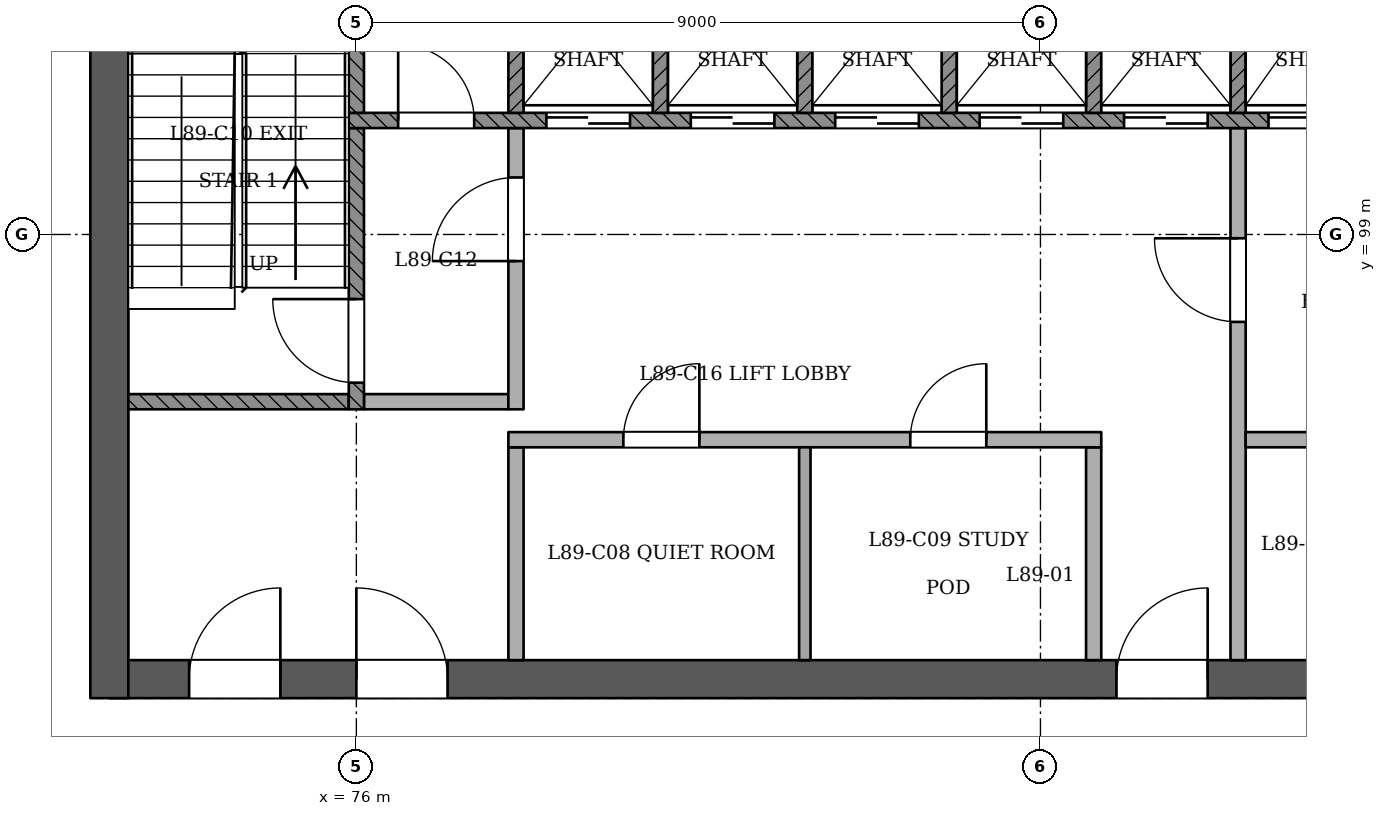
"""IFC4 building model, lengths in metres.
Left out: names, types, materials, properties, quantities, classifications, styles, units other than length and angle.
Written with IfcOpenShell. Run it as: python <this file> out.ifc"""

import sys

from ifc_helpers import new_model, si_unit, direction, frame, frame_2d, origin, place, context, subcontext, project, spatial, rectangle, extrude, element, fill, save


model = new_model("IFC4")
c1 = context("Model", 3, precision=1e-05, world=origin(), true_north=direction((0.0, 1.0)))
c2 = subcontext(c1, "Body", "Model", "MODEL_VIEW")
j1 = project(units=[si_unit("LENGTHUNIT", "METRE"), si_unit("PLANEANGLEUNIT", "RADIAN")], contexts=[c1])
p1 = place(None, origin())
s1 = spatial("IfcSite", under=j1, at=p1, CompositionType="ELEMENT")
p2 = place(p1, origin())
s2 = spatial("IfcBuilding", under=s1, at=p2, CompositionType="ELEMENT")
p3 = place(p2, frame((0.0, 0.0, 343.0)))
s3 = spatial("IfcBuildingStorey", under=s2, at=p3, CompositionType="ELEMENT", Elevation=343.0)
p4 = place(p3, frame((72.75, 93.15, 0.0), z_axis=(0.0, 0.0, 1.0), x_axis=(1.0, 0.0, 0.0)))
e1 = element("IfcWall", 1, at=p4, inside=s3, PredefinedType="SHEAR", context=c2, shape_type="SweptSolid", body=[
    extrude(rectangle(XDim=24.75, YDim=0.5, at=frame_2d((12.375, 0.0))), origin(), (0.0, 0.0, 1.0), 4.2),
])
p5 = place(p4, frame((1.05, 0.0, 0.0)))
e2 = element("IfcOpeningElement", 2, at=p5, cuts=e1, PredefinedType="OPENING", context=c2, shape_type="SweptSolid", body=[
    extrude(rectangle(XDim=1.2, YDim=2.1, at=frame_2d((0.6, 1.05))), frame((0.0, 0.26, 0.0), z_axis=(0.0, -1.0, 0.0), x_axis=(1.0, 0.0, 0.0)), (0.0, 0.0, 1.0), 0.521),
])
p6 = place(p4, frame((3.25, 0.0, 0.0)))
e3 = element("IfcOpeningElement", 3, at=p6, cuts=e1, PredefinedType="OPENING", context=c2, shape_type="SweptSolid", body=[
    extrude(rectangle(XDim=1.2, YDim=2.1, at=frame_2d((0.6, 1.05))), frame((0.0, 0.26, 0.0), z_axis=(0.0, -1.0, 0.0), x_axis=(1.0, 0.0, 0.0)), (0.0, 0.0, 1.0), 0.521),
])
p7 = place(p4, frame((13.25, 0.0, 0.0)))
e4 = element("IfcOpeningElement", 4, at=p7, cuts=e1, PredefinedType="OPENING", context=c2, shape_type="SweptSolid", body=[
    extrude(rectangle(XDim=1.2, YDim=2.1, at=frame_2d((0.6, 1.05))), frame((0.0, 0.26, 0.0), z_axis=(0.0, -1.0, 0.0), x_axis=(1.0, 0.0, 0.0)), (0.0, 0.0, 1.0), 0.521),
])
p8 = place(p4, frame((16.113, 0.0, 0.0)))
e5 = element("IfcOpeningElement", 5, at=p8, cuts=e1, PredefinedType="OPENING", context=c2, shape_type="SweptSolid", body=[
    extrude(rectangle(XDim=1.0, YDim=2.1, at=frame_2d((0.5, 1.05))), frame((0.0, 0.26, 0.0), z_axis=(0.0, -1.0, 0.0), x_axis=(1.0, 0.0, 0.0)), (0.0, 0.0, 1.0), 0.521),
])
p9 = place(p4, frame((19.55, 0.0, 0.0)))
e6 = element("IfcOpeningElement", 6, at=p9, cuts=e1, PredefinedType="OPENING", context=c2, shape_type="SweptSolid", body=[
    extrude(rectangle(XDim=1.0, YDim=2.1, at=frame_2d((0.5, 1.05))), frame((0.0, 0.26, 0.0), z_axis=(0.0, -1.0, 0.0), x_axis=(1.0, 0.0, 0.0)), (0.0, 0.0, 1.0), 0.521),
])
p10 = place(p4, frame((22.538, 0.0, 0.0)))
e7 = element("IfcOpeningElement", 7, at=p10, cuts=e1, PredefinedType="OPENING", context=c2, shape_type="SweptSolid", body=[
    extrude(rectangle(XDim=1.0, YDim=2.1, at=frame_2d((0.5, 1.05))), frame((0.0, 0.26, 0.0), z_axis=(0.0, -1.0, 0.0), x_axis=(1.0, 0.0, 0.0)), (0.0, 0.0, 1.0), 0.521),
])
p11 = place(p3, frame((72.75, 103.65, 0.0), z_axis=(0.0, 0.0, 1.0), x_axis=(0.0, -1.0, 0.0)))
e8 = element("IfcWall", 8, at=p11, inside=s3, PredefinedType="SHEAR", context=c2, shape_type="SweptSolid", body=[
    extrude(rectangle(XDim=10.75, YDim=0.5, at=frame_2d((5.375, 0.0))), origin(), (0.0, 0.0, 1.0), 4.2),
])
p12 = place(p3, frame((78.1, 93.4, 0.0), z_axis=(0.0, 0.0, 1.0), x_axis=(0.0, 1.0, 0.0)))
e9 = element("IfcWall", 9, at=p12, inside=s3, PredefinedType="PARTITIONING", context=c2, shape_type="SweptSolid", body=[
    extrude(rectangle(XDim=2.8, YDim=0.2, at=frame_2d((1.4, 0.0))), origin(), (0.0, 0.0, 1.0), 3.8),
])
p13 = place(p3, frame((81.9, 93.4, 0.0), z_axis=(0.0, 0.0, 1.0), x_axis=(0.0, 1.0, 0.0)))
e10 = element("IfcWall", 10, at=p13, inside=s3, PredefinedType="PARTITIONING", context=c2, shape_type="SweptSolid", body=[
    extrude(rectangle(XDim=2.8, YDim=0.15, at=frame_2d((1.4, 0.0))), origin(), (0.0, 0.0, 1.0), 3.8),
])
p14 = place(p3, frame((85.7, 93.4, 0.0), z_axis=(0.0, 0.0, 1.0), x_axis=(0.0, 1.0, 0.0)))
e11 = element("IfcWall", 11, at=p14, inside=s3, PredefinedType="PARTITIONING", context=c2, shape_type="SweptSolid", body=[
    extrude(rectangle(XDim=2.8, YDim=0.2, at=frame_2d((1.4, 0.0))), origin(), (0.0, 0.0, 1.0), 3.8),
])
p15 = place(p3, frame((87.6, 93.4, 0.0), z_axis=(0.0, 0.0, 1.0), x_axis=(0.0, 1.0, 0.0)))
e12 = element("IfcWall", 12, at=p15, inside=s3, PredefinedType="PARTITIONING", context=c2, shape_type="SweptSolid", body=[
    extrude(rectangle(XDim=7.0, YDim=0.2, at=frame_2d((3.5, 0.0))), origin(), (0.0, 0.0, 1.0), 3.8),
])
p16 = place(p15, frame((4.45, 0.0, 0.0)))
e13 = element("IfcOpeningElement", 13, at=p16, cuts=e12, PredefinedType="OPENING", context=c2, shape_type="SweptSolid", body=[
    extrude(rectangle(XDim=1.1, YDim=2.1, at=frame_2d((0.55, 1.05))), frame((0.0, 0.11, 0.0), z_axis=(0.0, -1.0, 0.0), x_axis=(1.0, 0.0, 0.0)), (0.0, 0.0, 1.0), 0.221),
])
p17 = place(p3, frame((78.0, 96.3, 0.0), z_axis=(0.0, 0.0, 1.0), x_axis=(1.0, 0.0, 0.0)))
e14 = element("IfcWall", 14, at=p17, inside=s3, PredefinedType="PARTITIONING", context=c2, shape_type="SweptSolid", body=[
    extrude(rectangle(XDim=7.8, YDim=0.2, at=frame_2d((3.9, 0.0))), origin(), (0.0, 0.0, 1.0), 3.8),
])
p18 = place(p17, frame((1.512, 0.0, 0.0)))
e15 = element("IfcOpeningElement", 15, at=p18, cuts=e14, PredefinedType="OPENING", context=c2, shape_type="SweptSolid", body=[
    extrude(rectangle(XDim=1.0, YDim=2.1, at=frame_2d((0.5, 1.05))), frame((0.0, 0.11, 0.0), z_axis=(0.0, -1.0, 0.0), x_axis=(1.0, 0.0, 0.0)), (0.0, 0.0, 1.0), 0.221),
])
p19 = place(p17, frame((5.288, 0.0, 0.0)))
e16 = element("IfcOpeningElement", 16, at=p19, cuts=e14, PredefinedType="OPENING", context=c2, shape_type="SweptSolid", body=[
    extrude(rectangle(XDim=1.0, YDim=2.1, at=frame_2d((0.5, 1.05))), frame((0.0, 0.11, 0.0), z_axis=(0.0, -1.0, 0.0), x_axis=(1.0, 0.0, 0.0)), (0.0, 0.0, 1.0), 0.221),
])
p20 = place(p3, frame((87.7, 96.3, 0.0), z_axis=(0.0, 0.0, 1.0), x_axis=(1.0, 0.0, 0.0)))
e17 = element("IfcWall", 17, at=p20, inside=s3, PredefinedType="PARTITIONING", context=c2, shape_type="SweptSolid", body=[
    extrude(rectangle(XDim=3.6, YDim=0.2, at=frame_2d((1.8, 0.0))), origin(), (0.0, 0.0, 1.0), 3.8),
])
p21 = place(p3, frame((73.0, 96.8, 0.0), z_axis=(0.0, 0.0, 1.0), x_axis=(1.0, 0.0, 0.0)))
e18 = element("IfcWall", 18, at=p21, inside=s3, PredefinedType="SOLIDWALL", context=c2, shape_type="SweptSolid", body=[
    extrude(rectangle(XDim=2.9, YDim=0.2, at=frame_2d((1.45, 0.0))), origin(), (0.0, 0.0, 1.0), 3.8),
])
p22 = place(p3, frame((76.0, 96.7, 0.0), z_axis=(0.0, 0.0, 1.0), x_axis=(0.0, 1.0, 0.0)))
e19 = element("IfcWall", 19, at=p22, inside=s3, PredefinedType="SOLIDWALL", context=c2, shape_type="SweptSolid", body=[
    extrude(rectangle(XDim=3.7, YDim=0.2, at=frame_2d((1.85, 0.0))), origin(), (0.0, 0.0, 1.0), 3.8),
])
p23 = place(p22, frame((0.35, 0.0, 0.0)))
e20 = element("IfcOpeningElement", 20, at=p23, cuts=e19, PredefinedType="OPENING", context=c2, shape_type="SweptSolid", body=[
    extrude(rectangle(XDim=1.1, YDim=2.1, at=frame_2d((0.55, 1.05))), frame((0.0, 0.11, 0.0), z_axis=(0.0, -1.0, 0.0), x_axis=(1.0, 0.0, 0.0)), (0.0, 0.0, 1.0), 0.221),
])
p24 = place(p3, frame((76.1, 96.8, 0.0), z_axis=(0.0, 0.0, 1.0), x_axis=(1.0, 0.0, 0.0)))
e21 = element("IfcWall", 21, at=p24, inside=s3, PredefinedType="PARTITIONING", context=c2, shape_type="SweptSolid", body=[
    extrude(rectangle(XDim=1.9, YDim=0.2, at=frame_2d((0.95, 0.0))), origin(), (0.0, 0.0, 1.0), 3.8),
])
p25 = place(p3, frame((78.1, 96.7, 0.0), z_axis=(0.0, 0.0, 1.0), x_axis=(0.0, 1.0, 0.0)))
e22 = element("IfcWall", 22, at=p25, inside=s3, PredefinedType="PARTITIONING", context=c2, shape_type="SweptSolid", body=[
    extrude(rectangle(XDim=3.7, YDim=0.2, at=frame_2d((1.85, 0.0))), origin(), (0.0, 0.0, 1.0), 3.8),
])
p26 = place(p25, frame((1.95, 0.0, 0.0)))
e23 = element("IfcOpeningElement", 23, at=p26, cuts=e22, PredefinedType="OPENING", context=c2, shape_type="SweptSolid", body=[
    extrude(rectangle(XDim=1.1, YDim=2.1, at=frame_2d((0.55, 1.05))), frame((0.0, 0.11, 0.0), z_axis=(0.0, -1.0, 0.0), x_axis=(1.0, 0.0, 0.0)), (0.0, 0.0, 1.0), 0.221),
])
p27 = place(p3, frame((75.9, 100.5, 0.0), z_axis=(0.0, 0.0, 1.0), x_axis=(1.0, 0.0, 0.0)))
e24 = element("IfcWall", 24, at=p27, inside=s3, PredefinedType="SOLIDWALL", context=c2, shape_type="SweptSolid", body=[
    extrude(rectangle(XDim=18.2, YDim=0.2, at=frame_2d((9.1, 0.0))), origin(), (0.0, 0.0, 1.0), 3.8),
])
p28 = place(p27, frame((2.6, 0.0, 0.0)))
e25 = element("IfcOpeningElement", 25, at=p28, cuts=e24, PredefinedType="OPENING", context=c2, shape_type="SweptSolid", body=[
    extrude(rectangle(XDim=1.1, YDim=2.1, at=frame_2d((0.55, 1.05))), frame((0.0, 0.11, 0.0), z_axis=(0.0, -1.0, 0.0), x_axis=(1.0, 0.0, 0.0)), (0.0, 0.0, 1.0), 0.221),
])
p29 = place(p27, frame((4.5, 0.0, 0.0)))
e26 = element("IfcOpeningElement", 26, at=p29, cuts=e24, PredefinedType="OPENING", context=c2, shape_type="SweptSolid", body=[
    extrude(rectangle(XDim=1.1, YDim=2.1, at=frame_2d((0.55, 1.05))), frame((0.0, 0.11, 0.0), z_axis=(0.0, -1.0, 0.0), x_axis=(1.0, 0.0, 0.0)), (0.0, 0.0, 1.0), 0.221),
])
p30 = place(p27, frame((6.4, 0.0, 0.0)))
e27 = element("IfcOpeningElement", 27, at=p30, cuts=e24, PredefinedType="OPENING", context=c2, shape_type="SweptSolid", body=[
    extrude(rectangle(XDim=1.1, YDim=2.1, at=frame_2d((0.55, 1.05))), frame((0.0, 0.11, 0.0), z_axis=(0.0, -1.0, 0.0), x_axis=(1.0, 0.0, 0.0)), (0.0, 0.0, 1.0), 0.221),
])
p31 = place(p27, frame((8.3, 0.0, 0.0)))
e28 = element("IfcOpeningElement", 28, at=p31, cuts=e24, PredefinedType="OPENING", context=c2, shape_type="SweptSolid", body=[
    extrude(rectangle(XDim=1.1, YDim=2.1, at=frame_2d((0.55, 1.05))), frame((0.0, 0.11, 0.0), z_axis=(0.0, -1.0, 0.0), x_axis=(1.0, 0.0, 0.0)), (0.0, 0.0, 1.0), 0.221),
])
p32 = place(p27, frame((10.2, 0.0, 0.0)))
e29 = element("IfcOpeningElement", 29, at=p32, cuts=e24, PredefinedType="OPENING", context=c2, shape_type="SweptSolid", body=[
    extrude(rectangle(XDim=1.1, YDim=2.1, at=frame_2d((0.55, 1.05))), frame((0.0, 0.11, 0.0), z_axis=(0.0, -1.0, 0.0), x_axis=(1.0, 0.0, 0.0)), (0.0, 0.0, 1.0), 0.221),
])
p33 = place(p27, frame((12.1, 0.0, 0.0)))
e30 = element("IfcOpeningElement", 30, at=p33, cuts=e24, PredefinedType="OPENING", context=c2, shape_type="SweptSolid", body=[
    extrude(rectangle(XDim=1.1, YDim=2.1, at=frame_2d((0.55, 1.05))), frame((0.0, 0.11, 0.0), z_axis=(0.0, -1.0, 0.0), x_axis=(1.0, 0.0, 0.0)), (0.0, 0.0, 1.0), 0.221),
])
p34 = place(p27, frame((14.0, 0.0, 0.0)))
e31 = element("IfcOpeningElement", 31, at=p34, cuts=e24, PredefinedType="OPENING", context=c2, shape_type="SweptSolid", body=[
    extrude(rectangle(XDim=1.1, YDim=2.1, at=frame_2d((0.55, 1.05))), frame((0.0, 0.11, 0.0), z_axis=(0.0, -1.0, 0.0), x_axis=(1.0, 0.0, 0.0)), (0.0, 0.0, 1.0), 0.221),
])
p35 = place(p27, frame((0.65, 0.0, 0.0)))
e32 = element("IfcOpeningElement", 32, at=p35, cuts=e24, PredefinedType="OPENING", context=c2, shape_type="SweptSolid", body=[
    extrude(rectangle(XDim=1.0, YDim=2.1, at=frame_2d((0.5, 1.05))), frame((0.0, 0.11, 0.0), z_axis=(0.0, -1.0, 0.0), x_axis=(1.0, 0.0, 0.0)), (0.0, 0.0, 1.0), 0.221),
])
p36 = place(p27, frame((16.3, 0.0, 0.0)))
e33 = element("IfcOpeningElement", 33, at=p36, cuts=e24, PredefinedType="OPENING", context=c2, shape_type="SweptSolid", body=[
    extrude(rectangle(XDim=1.0, YDim=2.1, at=frame_2d((0.5, 1.05))), frame((0.0, 0.11, 0.0), z_axis=(0.0, -1.0, 0.0), x_axis=(1.0, 0.0, 0.0)), (0.0, 0.0, 1.0), 0.221),
])
for number, where, z_axis, x_axis in (
    (34, (76.0, 100.6, 0.0), (0.0, 0.0, 1.0), (0.0, 1.0, 0.0)),
    (35, (78.1, 100.6, 0.0), (0.0, 0.0, 1.0), (0.0, 1.0, 0.0)),
    (36, (80.0, 100.6, 0.0), (0.0, 0.0, 1.0), (0.0, 1.0, 0.0)),
    (37, (81.9, 100.6, 0.0), (0.0, 0.0, 1.0), (0.0, 1.0, 0.0)),
    (38, (83.8, 100.6, 0.0), (0.0, 0.0, 1.0), (0.0, 1.0, 0.0)),
    (39, (85.7, 100.6, 0.0), (0.0, 0.0, 1.0), (0.0, 1.0, 0.0)),
    (40, (87.6, 100.6, 0.0), (0.0, 0.0, 1.0), (0.0, 1.0, 0.0)),
):
    element("IfcWall", number, at=place(p3, frame(where, z_axis=z_axis, x_axis=x_axis)), inside=s3, PredefinedType="SOLIDWALL", context=c2, shape_type="SweptSolid", body=[
        extrude(rectangle(XDim=2.8, YDim=0.2, at=frame_2d((1.4, 0.0))), origin(), (0.0, 0.0, 1.0), 3.8),
    ])
p37 = place(p28, origin())
e41 = element("IfcDoor", 41, at=p37, inside=s3, OperationType="SLIDING_TO_RIGHT", PredefinedType="NOTDEFINED", context=c2, shape_type="SweptSolid", body=[
    extrude(rectangle(XDim=1.1, YDim=2.1, at=frame_2d((0.55, 1.05))), frame((0.0, 0.025, 0.0), z_axis=(0.0, -1.0, 0.0), x_axis=(1.0, 0.0, 0.0)), (0.0, 0.0, 1.0), 0.05),
])
fill(e25, e41)
p38 = place(p29, origin())
e42 = element("IfcDoor", 42, at=p38, inside=s3, OperationType="SLIDING_TO_LEFT", PredefinedType="NOTDEFINED", context=c2, shape_type="SweptSolid", body=[
    extrude(rectangle(XDim=1.1, YDim=2.1, at=frame_2d((0.55, 1.05))), frame((0.0, 0.025, 0.0), z_axis=(0.0, -1.0, 0.0), x_axis=(1.0, 0.0, 0.0)), (0.0, 0.0, 1.0), 0.05),
])
fill(e26, e42)
p39 = place(p30, origin())
e43 = element("IfcDoor", 43, at=p39, inside=s3, OperationType="SLIDING_TO_RIGHT", PredefinedType="NOTDEFINED", context=c2, shape_type="SweptSolid", body=[
    extrude(rectangle(XDim=1.1, YDim=2.1, at=frame_2d((0.55, 1.05))), frame((0.0, 0.025, 0.0), z_axis=(0.0, -1.0, 0.0), x_axis=(1.0, 0.0, 0.0)), (0.0, 0.0, 1.0), 0.05),
])
fill(e27, e43)
p40 = place(p31, origin())
e44 = element("IfcDoor", 44, at=p40, inside=s3, OperationType="SLIDING_TO_LEFT", PredefinedType="NOTDEFINED", context=c2, shape_type="SweptSolid", body=[
    extrude(rectangle(XDim=1.1, YDim=2.1, at=frame_2d((0.55, 1.05))), frame((0.0, 0.025, 0.0), z_axis=(0.0, -1.0, 0.0), x_axis=(1.0, 0.0, 0.0)), (0.0, 0.0, 1.0), 0.05),
])
fill(e28, e44)
p41 = place(p32, origin())
e45 = element("IfcDoor", 45, at=p41, inside=s3, OperationType="SLIDING_TO_RIGHT", PredefinedType="NOTDEFINED", context=c2, shape_type="SweptSolid", body=[
    extrude(rectangle(XDim=1.1, YDim=2.1, at=frame_2d((0.55, 1.05))), frame((0.0, 0.025, 0.0), z_axis=(0.0, -1.0, 0.0), x_axis=(1.0, 0.0, 0.0)), (0.0, 0.0, 1.0), 0.05),
])
fill(e29, e45)
p42 = place(p33, origin())
e46 = element("IfcDoor", 46, at=p42, inside=s3, OperationType="SLIDING_TO_RIGHT", PredefinedType="NOTDEFINED", context=c2, shape_type="SweptSolid", body=[
    extrude(rectangle(XDim=1.1, YDim=2.1, at=frame_2d((0.55, 1.05))), frame((0.0, 0.025, 0.0), z_axis=(0.0, -1.0, 0.0), x_axis=(1.0, 0.0, 0.0)), (0.0, 0.0, 1.0), 0.05),
])
fill(e30, e46)
p43 = place(p23, origin())
e47 = element("IfcDoor", 47, at=p43, inside=s3, OperationType="SINGLE_SWING_RIGHT", PredefinedType="NOTDEFINED", context=c2, shape_type="SweptSolid", body=[
    extrude(rectangle(XDim=1.1, YDim=2.1, at=frame_2d((0.55, 1.05))), frame((0.0, 0.025, 0.0), z_axis=(0.0, -1.0, 0.0), x_axis=(1.0, 0.0, 0.0)), (0.0, 0.0, 1.0), 0.05),
])
fill(e20, e47)
p44 = place(p26, origin())
e48 = element("IfcDoor", 48, at=p44, inside=s3, OperationType="SINGLE_SWING_LEFT", PredefinedType="NOTDEFINED", context=c2, shape_type="SweptSolid", body=[
    extrude(rectangle(XDim=1.1, YDim=2.1, at=frame_2d((0.55, 1.05))), frame((0.0, 0.025, 0.0), z_axis=(0.0, -1.0, 0.0), x_axis=(1.0, 0.0, 0.0)), (0.0, 0.0, 1.0), 0.05),
])
fill(e23, e48)
p45 = place(p16, origin())
e49 = element("IfcDoor", 49, at=p45, inside=s3, OperationType="SINGLE_SWING_RIGHT", PredefinedType="NOTDEFINED", context=c2, shape_type="SweptSolid", body=[
    extrude(rectangle(XDim=1.1, YDim=2.1, at=frame_2d((0.55, 1.05))), frame((0.0, 0.025, 0.0), z_axis=(0.0, -1.0, 0.0), x_axis=(1.0, 0.0, 0.0)), (0.0, 0.0, 1.0), 0.05),
])
fill(e13, e49)
p46 = place(p5, origin())
e50 = element("IfcDoor", 50, at=p46, inside=s3, OperationType="SINGLE_SWING_RIGHT", PredefinedType="NOTDEFINED", context=c2, shape_type="SweptSolid", body=[
    extrude(rectangle(XDim=1.2, YDim=2.1, at=frame_2d((0.6, 1.05))), frame((0.0, 0.025, 0.0), z_axis=(0.0, -1.0, 0.0), x_axis=(1.0, 0.0, 0.0)), (0.0, 0.0, 1.0), 0.05),
])
fill(e2, e50)
p47 = place(p6, origin())
e51 = element("IfcDoor", 51, at=p47, inside=s3, OperationType="SINGLE_SWING_LEFT", PredefinedType="NOTDEFINED", context=c2, shape_type="SweptSolid", body=[
    extrude(rectangle(XDim=1.2, YDim=2.1, at=frame_2d((0.6, 1.05))), frame((0.0, 0.025, 0.0), z_axis=(0.0, -1.0, 0.0), x_axis=(1.0, 0.0, 0.0)), (0.0, 0.0, 1.0), 0.05),
])
fill(e3, e51)
p48 = place(p7, origin())
e52 = element("IfcDoor", 52, at=p48, inside=s3, OperationType="SINGLE_SWING_RIGHT", PredefinedType="NOTDEFINED", context=c2, shape_type="SweptSolid", body=[
    extrude(rectangle(XDim=1.2, YDim=2.1, at=frame_2d((0.6, 1.05))), frame((0.0, 0.025, 0.0), z_axis=(0.0, -1.0, 0.0), x_axis=(1.0, 0.0, 0.0)), (0.0, 0.0, 1.0), 0.05),
])
fill(e4, e52)
p49 = place(p35, origin())
e53 = element("IfcDoor", 53, at=p49, inside=s3, OperationType="SINGLE_SWING_LEFT", PredefinedType="NOTDEFINED", context=c2, shape_type="SweptSolid", body=[
    extrude(rectangle(XDim=1.0, YDim=2.1, at=frame_2d((0.5, 1.05))), frame((0.0, 0.025, 0.0), z_axis=(0.0, -1.0, 0.0), x_axis=(1.0, 0.0, 0.0)), (0.0, 0.0, 1.0), 0.05),
])
fill(e32, e53)
p50 = place(p18, origin())
e54 = element("IfcDoor", 54, at=p50, inside=s3, OperationType="SINGLE_SWING_RIGHT", PredefinedType="NOTDEFINED", context=c2, shape_type="SweptSolid", body=[
    extrude(rectangle(XDim=1.0, YDim=2.1, at=frame_2d((0.5, 1.05))), frame((0.0, 0.025, 0.0), z_axis=(0.0, -1.0, 0.0), x_axis=(1.0, 0.0, 0.0)), (0.0, 0.0, 1.0), 0.05),
])
fill(e15, e54)
p51 = place(p19, origin())
e55 = element("IfcDoor", 55, at=p51, inside=s3, OperationType="SINGLE_SWING_RIGHT", PredefinedType="NOTDEFINED", context=c2, shape_type="SweptSolid", body=[
    extrude(rectangle(XDim=1.0, YDim=2.1, at=frame_2d((0.5, 1.05))), frame((0.0, 0.025, 0.0), z_axis=(0.0, -1.0, 0.0), x_axis=(1.0, 0.0, 0.0)), (0.0, 0.0, 1.0), 0.05),
])
fill(e16, e55)
save(model, sys.argv[1])
